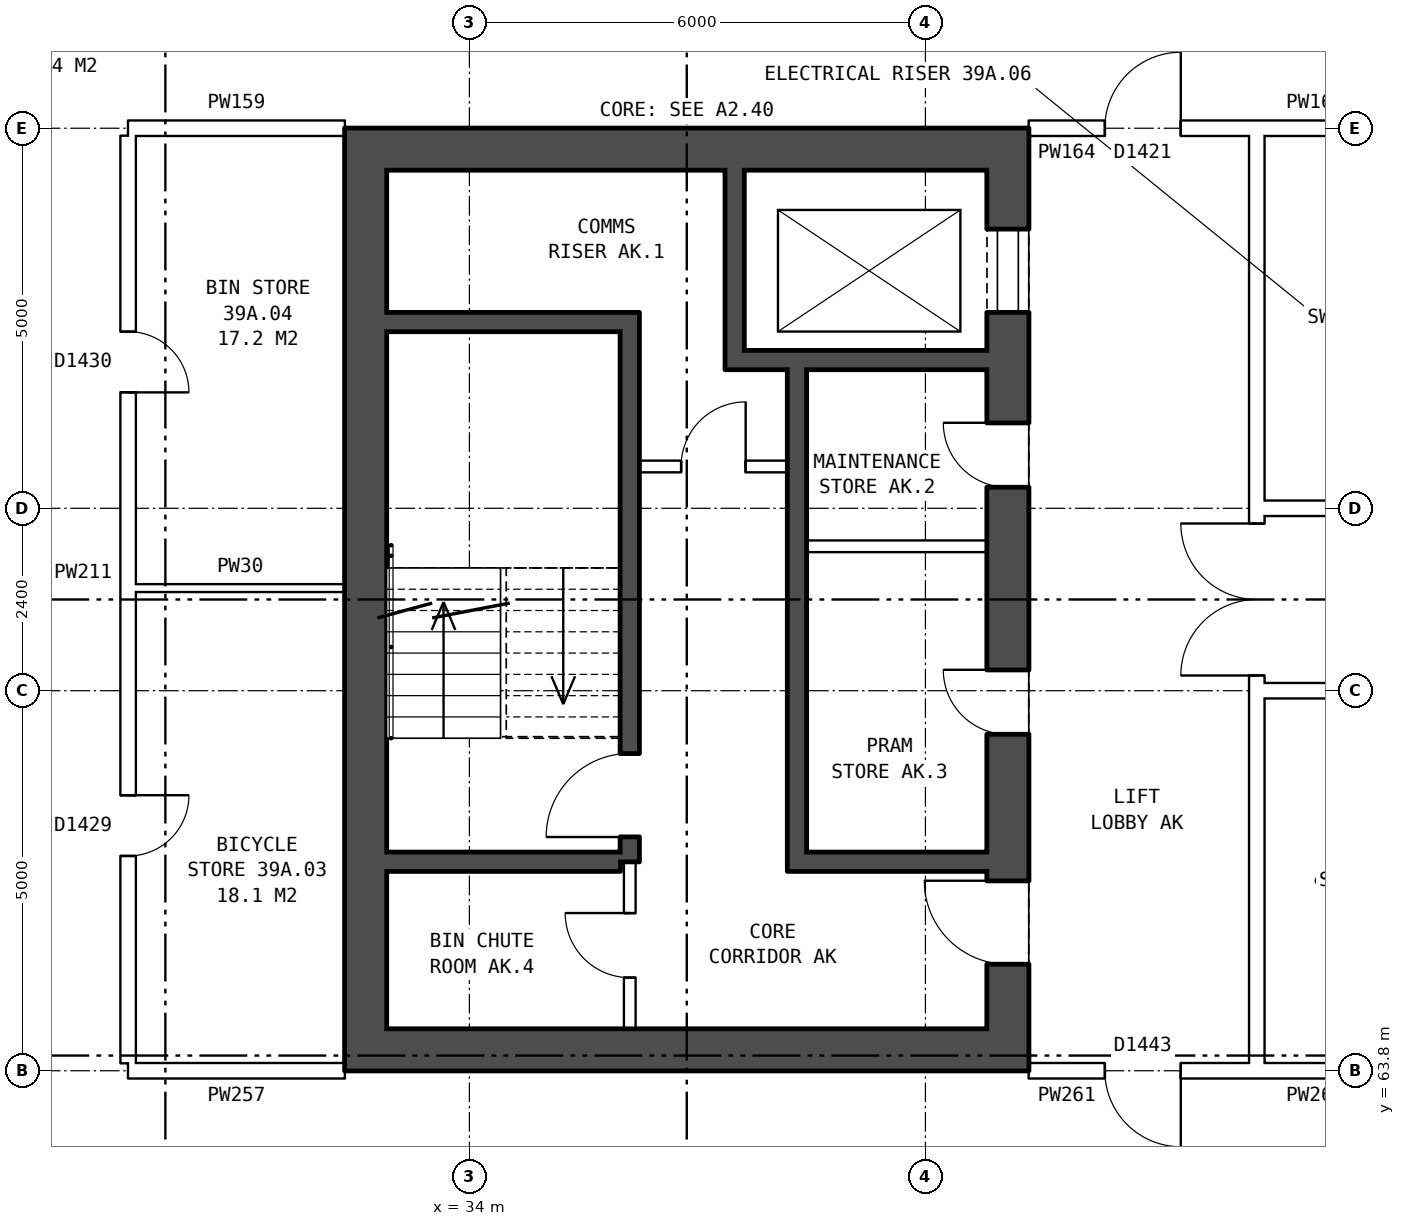
"""IFC4 building model, lengths in metres.
Left out: names, types, materials, properties, quantities, classifications, styles, units other than length and angle.
Written with IfcOpenShell. Run it as: python <this file> out.ifc"""

import sys

from ifc_helpers import new_model, si_unit, direction, frame, frame_2d, origin, place, context, subcontext, project, spatial, rectangle, extrude, element, fill, save


model = new_model("IFC4")
c1 = context("Model", 3, precision=1e-05, world=origin(), true_north=direction((0.0, 1.0)))
c2 = subcontext(c1, "Body", "Model", "MODEL_VIEW")
j1 = project(units=[si_unit("LENGTHUNIT", "METRE"), si_unit("PLANEANGLEUNIT", "RADIAN")], contexts=[c1])
p1 = place(None, origin())
s1 = spatial("IfcSite", under=j1, at=p1, CompositionType="ELEMENT")
p2 = place(p1, origin())
s2 = spatial("IfcBuilding", under=s1, at=p2, CompositionType="ELEMENT")
p3 = place(p2, frame((0.0, 0.0, 139.2)))
s3 = spatial("IfcBuildingStorey", under=s2, at=p3, CompositionType="ELEMENT", Elevation=139.2)
p4 = place(p3, frame((41.085, 76.2, 0.0), z_axis=(0.0, 0.0, 1.0), x_axis=(0.0, -1.0, 0.0)))
e1 = element("IfcWall", 1, at=p4, inside=s3, PredefinedType="SHEAR", context=c2, shape_type="SweptSolid", body=[
    extrude(rectangle(XDim=12.4, YDim=0.55, at=frame_2d((6.2, 0.0))), origin(), (0.0, 0.0, 1.0), 2.85),
])
p5 = place(p4, frame((1.325, 0.0, 0.0)))
e2 = element("IfcOpeningElement", 2, at=p5, cuts=e1, PredefinedType="OPENING", context=c2, shape_type="SweptSolid", body=[
    extrude(rectangle(XDim=1.1, YDim=2.1, at=frame_2d((0.55, 1.05))), frame((0.0, 0.285, 0.0), z_axis=(0.0, -1.0, 0.0), x_axis=(1.0, 0.0, 0.0)), (0.0, 0.0, 1.0), 0.57),
])
p6 = place(p4, frame((3.875, 0.0, 0.0)))
e3 = element("IfcOpeningElement", 3, at=p6, cuts=e1, PredefinedType="OPENING", context=c2, shape_type="SweptSolid", body=[
    extrude(rectangle(XDim=0.85, YDim=2.1, at=frame_2d((0.425, 1.05))), frame((0.0, 0.285, 0.0), z_axis=(0.0, -1.0, 0.0), x_axis=(1.0, 0.0, 0.0)), (0.0, 0.0, 1.0), 0.57),
])
p7 = place(p4, frame((7.125, 0.0, 0.0)))
e4 = element("IfcOpeningElement", 4, at=p7, cuts=e1, PredefinedType="OPENING", context=c2, shape_type="SweptSolid", body=[
    extrude(rectangle(XDim=0.85, YDim=2.1, at=frame_2d((0.425, 1.05))), frame((0.0, 0.285, 0.0), z_axis=(0.0, -1.0, 0.0), x_axis=(1.0, 0.0, 0.0)), (0.0, 0.0, 1.0), 0.57),
])
p8 = place(p4, frame((9.9, 0.0, 0.0)))
e5 = element("IfcOpeningElement", 5, at=p8, cuts=e1, PredefinedType="OPENING", context=c2, shape_type="SweptSolid", body=[
    extrude(rectangle(XDim=1.1, YDim=2.1, at=frame_2d((0.55, 1.05))), frame((0.0, 0.285, 0.0), z_axis=(0.0, -1.0, 0.0), x_axis=(1.0, 0.0, 0.0)), (0.0, 0.0, 1.0), 0.57),
])
p9 = place(p3, frame((32.635, 76.2, 0.0), z_axis=(0.0, 0.0, 1.0), x_axis=(0.0, -1.0, 0.0)))
e6 = element("IfcWall", 6, at=p9, inside=s3, PredefinedType="SHEAR", context=c2, shape_type="SweptSolid", body=[
    extrude(rectangle(XDim=12.4, YDim=0.55, at=frame_2d((6.2, 0.0))), origin(), (0.0, 0.0, 1.0), 2.85),
])
for number, where, z_axis, x_axis in (
    (7, (40.81, 75.925, 0.0), (0.0, 0.0, 1.0), (-1.0, 0.0, 0.0)),
    (8, (40.81, 64.075, 0.0), (0.0, 0.0, 1.0), (-1.0, 0.0, 0.0)),
):
    element("IfcWall", number, at=place(p3, frame(where, z_axis=z_axis, x_axis=x_axis)), inside=s3, PredefinedType="SHEAR", context=c2, shape_type="SweptSolid", body=[
        extrude(rectangle(XDim=7.9, YDim=0.55, at=frame_2d((3.95, 0.0))), origin(), (0.0, 0.0, 1.0), 2.85),
    ])
p10 = place(p3, frame((35.985, 73.65, 0.0), z_axis=(0.0, 0.0, 1.0), x_axis=(-1.0, 0.0, 0.0)))
e9 = element("IfcWall", 9, at=p10, inside=s3, PredefinedType="SHEAR", context=c2, shape_type="SweptSolid", body=[
    extrude(rectangle(XDim=3.075, YDim=0.25, at=frame_2d((1.538, 0.0))), origin(), (0.0, 0.0, 1.0), 2.85),
])
p11 = place(p3, frame((40.81, 73.15, 0.0), z_axis=(0.0, 0.0, 1.0), x_axis=(-1.0, 0.0, 0.0)))
e10 = element("IfcWall", 10, at=p11, inside=s3, PredefinedType="SHEAR", context=c2, shape_type="SweptSolid", body=[
    extrude(rectangle(XDim=3.445, YDim=0.25, at=frame_2d((1.723, 0.0))), origin(), (0.0, 0.0, 1.0), 2.85),
])
p12 = place(p3, frame((38.185, 71.75, 0.0), z_axis=(0.0, 0.0, 1.0), x_axis=(-1.0, 0.0, 0.0)))
e11 = element("IfcWall", 11, at=p12, inside=s3, PredefinedType="PARTITIONING", context=c2, shape_type="SweptSolid", body=[
    extrude(rectangle(XDim=1.95, YDim=0.15, at=frame_2d((0.975, 0.0))), origin(), (0.0, 0.0, 1.0), 2.85),
])
p13 = place(p12, frame((0.55, 0.0, 0.0)))
e12 = element("IfcOpeningElement", 12, at=p13, cuts=e11, PredefinedType="OPENING", context=c2, shape_type="SweptSolid", body=[
    extrude(rectangle(XDim=0.85, YDim=2.1, at=frame_2d((0.425, 1.05))), frame((0.0, 0.085, 0.0), z_axis=(0.0, -1.0, 0.0), x_axis=(1.0, 0.0, 0.0)), (0.0, 0.0, 1.0), 0.17),
])
p14 = place(p3, frame((40.81, 70.7, 0.0), z_axis=(0.0, 0.0, 1.0), x_axis=(-1.0, 0.0, 0.0)))
e13 = element("IfcWall", 13, at=p14, inside=s3, PredefinedType="PARTITIONING", context=c2, shape_type="SweptSolid", body=[
    extrude(rectangle(XDim=2.375, YDim=0.15, at=frame_2d((1.188, 0.0))), origin(), (0.0, 0.0, 1.0), 2.85),
])
p15 = place(p3, frame((40.81, 66.55, 0.0), z_axis=(0.0, 0.0, 1.0), x_axis=(-1.0, 0.0, 0.0)))
e14 = element("IfcWall", 14, at=p15, inside=s3, PredefinedType="SHEAR", context=c2, shape_type="SweptSolid", body=[
    extrude(rectangle(XDim=2.375, YDim=0.25, at=frame_2d((1.188, 0.0))), origin(), (0.0, 0.0, 1.0), 2.85),
])
p16 = place(p3, frame((35.985, 66.55, 0.0), z_axis=(0.0, 0.0, 1.0), x_axis=(-1.0, 0.0, 0.0)))
e15 = element("IfcWall", 15, at=p16, inside=s3, PredefinedType="SHEAR", context=c2, shape_type="SweptSolid", body=[
    extrude(rectangle(XDim=3.075, YDim=0.25, at=frame_2d((1.538, 0.0))), origin(), (0.0, 0.0, 1.0), 2.85),
])
p17 = place(p3, frame((38.31, 73.025, 0.0), z_axis=(0.0, 0.0, 1.0), x_axis=(0.0, -1.0, 0.0)))
e16 = element("IfcWall", 16, at=p17, inside=s3, PredefinedType="SHEAR", context=c2, shape_type="SweptSolid", body=[
    extrude(rectangle(XDim=6.6, YDim=0.25, at=frame_2d((3.3, 0.0))), origin(), (0.0, 0.0, 1.0), 2.85),
])
p18 = place(p3, frame((37.49, 75.65, 0.0), z_axis=(0.0, 0.0, 1.0), x_axis=(0.0, -1.0, 0.0)))
e17 = element("IfcWall", 17, at=p18, inside=s3, PredefinedType="SHEAR", context=c2, shape_type="SweptSolid", body=[
    extrude(rectangle(XDim=2.375, YDim=0.25, at=frame_2d((1.188, 0.0))), origin(), (0.0, 0.0, 1.0), 2.85),
])
p19 = place(p3, frame((36.11, 73.775, 0.0), z_axis=(0.0, 0.0, 1.0), x_axis=(0.0, -1.0, 0.0)))
e18 = element("IfcWall", 18, at=p19, inside=s3, PredefinedType="SHEAR", context=c2, shape_type="SweptSolid", body=[
    extrude(rectangle(XDim=7.225, YDim=0.25, at=frame_2d((3.612, 0.0))), origin(), (0.0, 0.0, 1.0), 2.85),
])
p20 = place(p19, frame((5.8, 0.0, 0.0)))
e19 = element("IfcOpeningElement", 19, at=p20, cuts=e18, PredefinedType="OPENING", context=c2, shape_type="SweptSolid", body=[
    extrude(rectangle(XDim=1.1, YDim=2.1, at=frame_2d((0.55, 1.05))), frame((0.0, 0.135, 0.0), z_axis=(0.0, -1.0, 0.0), x_axis=(1.0, 0.0, 0.0)), (0.0, 0.0, 1.0), 0.27),
])
p21 = place(p3, frame((36.11, 66.55, 0.0), z_axis=(0.0, 0.0, 1.0), x_axis=(0.0, -1.0, 0.0)))
e20 = element("IfcWall", 20, at=p21, inside=s3, PredefinedType="PARTITIONING", context=c2, shape_type="SweptSolid", body=[
    extrude(rectangle(XDim=2.2, YDim=0.15, at=frame_2d((1.1, 0.0))), origin(), (0.0, 0.0, 1.0), 2.85),
])
p22 = place(p21, frame((0.675, 0.0, 0.0)))
e21 = element("IfcOpeningElement", 21, at=p22, cuts=e20, PredefinedType="OPENING", context=c2, shape_type="SweptSolid", body=[
    extrude(rectangle(XDim=0.85, YDim=2.1, at=frame_2d((0.425, 1.05))), frame((0.0, 0.085, 0.0), z_axis=(0.0, -1.0, 0.0), x_axis=(1.0, 0.0, 0.0)), (0.0, 0.0, 1.0), 0.17),
])
p23 = place(p3, frame((44.36, 63.9, 0.0), z_axis=(0.0, 0.0, 1.0), x_axis=(0.0, 1.0, 0.0)))
e22 = element("IfcWall", 22, at=p23, inside=s3, PredefinedType="PARTITIONING", context=c2, shape_type="SweptSolid", body=[
    extrude(rectangle(XDim=12.2, YDim=0.2, at=frame_2d((6.1, 0.0))), origin(), (0.0, 0.0, 1.0), 2.85),
])
p24 = place(p23, frame((5.1, 0.0, 0.0)))
e23 = element("IfcOpeningElement", 23, at=p24, cuts=e22, PredefinedType="OPENING", context=c2, shape_type="SweptSolid", body=[
    extrude(rectangle(XDim=2.0, YDim=2.1, at=frame_2d((1.0, 1.05))), frame((0.0, 0.11, 0.0), z_axis=(0.0, -1.0, 0.0), x_axis=(1.0, 0.0, 0.0)), (0.0, 0.0, 1.0), 0.22),
])
p25 = place(p3, frame((29.51, 63.8, 0.0), z_axis=(0.0, 0.0, 1.0), x_axis=(1.0, 0.0, 0.0)))
e24 = element("IfcWall", 24, at=p25, inside=s3, PredefinedType="PARTITIONING", context=c2, shape_type="SweptSolid", body=[
    extrude(rectangle(XDim=2.85, YDim=0.2, at=frame_2d((1.425, 0.0))), origin(), (0.0, 0.0, 1.0), 2.85),
])
p26 = place(p3, frame((41.36, 63.8, 0.0), z_axis=(0.0, 0.0, 1.0), x_axis=(1.0, 0.0, 0.0)))
e25 = element("IfcWall", 25, at=p26, inside=s3, PredefinedType="PARTITIONING", context=c2, shape_type="SweptSolid", body=[
    extrude(rectangle(XDim=3.0, YDim=0.2, at=frame_2d((1.5, 0.0))), origin(), (0.0, 0.0, 1.0), 2.85),
])
p27 = place(p26, frame((1.0, 0.0, 0.0)))
e26 = element("IfcOpeningElement", 26, at=p27, cuts=e25, PredefinedType="OPENING", context=c2, shape_type="SweptSolid", body=[
    extrude(rectangle(XDim=1.0, YDim=2.1, at=frame_2d((0.5, 1.05))), frame((0.0, 0.11, 0.0), z_axis=(0.0, -1.0, 0.0), x_axis=(1.0, 0.0, 0.0)), (0.0, 0.0, 1.0), 0.22),
])
p28 = place(p3, frame((44.36, 63.8, 0.0), z_axis=(0.0, 0.0, 1.0), x_axis=(1.0, 0.0, 0.0)))
e27 = element("IfcWall", 27, at=p28, inside=s3, PredefinedType="PARTITIONING", context=c2, shape_type="SweptSolid", body=[
    extrude(rectangle(XDim=1.54, YDim=0.2, at=frame_2d((0.77, 0.0))), origin(), (0.0, 0.0, 1.0), 2.85),
])
p29 = place(p3, frame((44.36, 68.8, 0.0), z_axis=(0.0, 0.0, 1.0), x_axis=(1.0, 0.0, 0.0)))
e28 = element("IfcWall", 28, at=p29, inside=s3, PredefinedType="PARTITIONING", context=c2, shape_type="SweptSolid", body=[
    extrude(rectangle(XDim=19.28, YDim=0.2, at=frame_2d((9.64, 0.0))), origin(), (0.0, 0.0, 1.0), 2.85),
])
p30 = place(p29, frame((14.64, 0.0, 0.0)))
e29 = element("IfcOpeningElement", 29, at=p30, cuts=e28, PredefinedType="OPENING", context=c2, shape_type="SweptSolid", body=[
    extrude(rectangle(XDim=1.0, YDim=2.1, at=frame_2d((0.5, 1.05))), frame((0.0, 0.11, 0.0), z_axis=(0.0, -1.0, 0.0), x_axis=(1.0, 0.0, 0.0)), (0.0, 0.0, 1.0), 0.22),
])
p31 = place(p29, frame((8.64, 0.0, 0.0)))
e30 = element("IfcOpeningElement", 30, at=p31, cuts=e28, PredefinedType="OPENING", context=c2, shape_type="SweptSolid", body=[
    extrude(rectangle(XDim=1.0, YDim=2.1, at=frame_2d((0.5, 1.05))), frame((0.0, 0.11, 0.0), z_axis=(0.0, -1.0, 0.0), x_axis=(1.0, 0.0, 0.0)), (0.0, 0.0, 1.0), 0.22),
])
p32 = place(p29, frame((2.64, 0.0, 0.0)))
e31 = element("IfcOpeningElement", 31, at=p32, cuts=e28, PredefinedType="OPENING", context=c2, shape_type="SweptSolid", body=[
    extrude(rectangle(XDim=1.0, YDim=2.1, at=frame_2d((0.5, 1.05))), frame((0.0, 0.11, 0.0), z_axis=(0.0, -1.0, 0.0), x_axis=(1.0, 0.0, 0.0)), (0.0, 0.0, 1.0), 0.22),
])
p33 = place(p3, frame((29.61, 70.15, 0.0), z_axis=(0.0, 0.0, 1.0), x_axis=(1.0, 0.0, 0.0)))
e32 = element("IfcWall", 32, at=p33, inside=s3, PredefinedType="PARTITIONING", context=c2, shape_type="SweptSolid", body=[
    extrude(rectangle(XDim=2.75, YDim=0.1, at=frame_2d((1.375, 0.0))), origin(), (0.0, 0.0, 1.0), 2.85),
])
p34 = place(p3, frame((44.36, 71.2, 0.0), z_axis=(0.0, 0.0, 1.0), x_axis=(1.0, 0.0, 0.0)))
e33 = element("IfcWall", 33, at=p34, inside=s3, PredefinedType="PARTITIONING", context=c2, shape_type="SweptSolid", body=[
    extrude(rectangle(XDim=19.28, YDim=0.2, at=frame_2d((9.64, 0.0))), origin(), (0.0, 0.0, 1.0), 2.85),
])
p35 = place(p34, frame((17.46, 0.0, 0.0)))
e34 = element("IfcOpeningElement", 34, at=p35, cuts=e33, PredefinedType="OPENING", context=c2, shape_type="SweptSolid", body=[
    extrude(rectangle(XDim=1.0, YDim=2.1, at=frame_2d((0.5, 1.05))), frame((0.0, 0.11, 0.0), z_axis=(0.0, -1.0, 0.0), x_axis=(1.0, 0.0, 0.0)), (0.0, 0.0, 1.0), 0.22),
])
p36 = place(p34, frame((8.64, 0.0, 0.0)))
e35 = element("IfcOpeningElement", 35, at=p36, cuts=e33, PredefinedType="OPENING", context=c2, shape_type="SweptSolid", body=[
    extrude(rectangle(XDim=1.0, YDim=2.1, at=frame_2d((0.5, 1.05))), frame((0.0, 0.11, 0.0), z_axis=(0.0, -1.0, 0.0), x_axis=(1.0, 0.0, 0.0)), (0.0, 0.0, 1.0), 0.22),
])
p37 = place(p34, frame((2.64, 0.0, 0.0)))
e36 = element("IfcOpeningElement", 36, at=p37, cuts=e33, PredefinedType="OPENING", context=c2, shape_type="SweptSolid", body=[
    extrude(rectangle(XDim=1.0, YDim=2.1, at=frame_2d((0.5, 1.05))), frame((0.0, 0.11, 0.0), z_axis=(0.0, -1.0, 0.0), x_axis=(1.0, 0.0, 0.0)), (0.0, 0.0, 1.0), 0.22),
])
p38 = place(p3, frame((29.51, 76.2, 0.0), z_axis=(0.0, 0.0, 1.0), x_axis=(1.0, 0.0, 0.0)))
e37 = element("IfcWall", 37, at=p38, inside=s3, PredefinedType="PARTITIONING", context=c2, shape_type="SweptSolid", body=[
    extrude(rectangle(XDim=2.85, YDim=0.2, at=frame_2d((1.425, 0.0))), origin(), (0.0, 0.0, 1.0), 2.85),
])
p39 = place(p3, frame((41.36, 76.2, 0.0), z_axis=(0.0, 0.0, 1.0), x_axis=(1.0, 0.0, 0.0)))
e38 = element("IfcWall", 38, at=p39, inside=s3, PredefinedType="PARTITIONING", context=c2, shape_type="SweptSolid", body=[
    extrude(rectangle(XDim=3.0, YDim=0.2, at=frame_2d((1.5, 0.0))), origin(), (0.0, 0.0, 1.0), 2.85),
])
p40 = place(p39, frame((1.0, 0.0, 0.0)))
e39 = element("IfcOpeningElement", 39, at=p40, cuts=e38, PredefinedType="OPENING", context=c2, shape_type="SweptSolid", body=[
    extrude(rectangle(XDim=1.0, YDim=2.1, at=frame_2d((0.5, 1.05))), frame((0.0, 0.11, 0.0), z_axis=(0.0, -1.0, 0.0), x_axis=(1.0, 0.0, 0.0)), (0.0, 0.0, 1.0), 0.22),
])
p41 = place(p3, frame((44.36, 76.2, 0.0), z_axis=(0.0, 0.0, 1.0), x_axis=(1.0, 0.0, 0.0)))
e40 = element("IfcWall", 40, at=p41, inside=s3, PredefinedType="PARTITIONING", context=c2, shape_type="SweptSolid", body=[
    extrude(rectangle(XDim=1.54, YDim=0.2, at=frame_2d((0.77, 0.0))), origin(), (0.0, 0.0, 1.0), 2.85),
])
p42 = place(p3, frame((29.51, 63.9, 0.0), z_axis=(0.0, 0.0, 1.0), x_axis=(0.0, 1.0, 0.0)))
e41 = element("IfcWall", 41, at=p42, inside=s3, PredefinedType="PARTITIONING", context=c2, shape_type="SweptSolid", body=[
    extrude(rectangle(XDim=12.2, YDim=0.2, at=frame_2d((6.1, 0.0))), origin(), (0.0, 0.0, 1.0), 2.85),
])
p43 = place(p42, frame((2.725, 0.0, 0.0)))
e42 = element("IfcOpeningElement", 42, at=p43, cuts=e41, PredefinedType="OPENING", context=c2, shape_type="SweptSolid", body=[
    extrude(rectangle(XDim=0.8, YDim=2.1, at=frame_2d((0.4, 1.05))), frame((0.0, 0.11, 0.0), z_axis=(0.0, -1.0, 0.0), x_axis=(1.0, 0.0, 0.0)), (0.0, 0.0, 1.0), 0.22),
])
p44 = place(p42, frame((8.825, 0.0, 0.0)))
e43 = element("IfcOpeningElement", 43, at=p44, cuts=e41, PredefinedType="OPENING", context=c2, shape_type="SweptSolid", body=[
    extrude(rectangle(XDim=0.8, YDim=2.1, at=frame_2d((0.4, 1.05))), frame((0.0, 0.11, 0.0), z_axis=(0.0, -1.0, 0.0), x_axis=(1.0, 0.0, 0.0)), (0.0, 0.0, 1.0), 0.22),
])
p45 = place(p5, origin())
e44 = element("IfcDoor", 44, at=p45, inside=s3, OperationType="DOUBLE_DOOR_SLIDING", PredefinedType="DOOR", context=c2, shape_type="SweptSolid", body=[
    extrude(rectangle(XDim=1.1, YDim=2.1, at=frame_2d((0.55, 1.05))), frame((0.0, -0.21, 0.0), z_axis=(0.0, -1.0, 0.0), x_axis=(1.0, 0.0, 0.0)), (0.0, 0.0, 1.0), 0.05),
])
fill(e2, e44)
p46 = place(p6, frame((0.85, 0.0, 0.0), z_axis=(0.0, 0.0, 1.0), x_axis=(-1.0, 0.0, 0.0)))
e45 = element("IfcDoor", 45, at=p46, inside=s3, OperationType="SINGLE_SWING_RIGHT", PredefinedType="DOOR", context=c2, shape_type="SweptSolid", body=[
    extrude(rectangle(XDim=0.85, YDim=2.1, at=frame_2d((0.425, 1.05))), frame((0.0, 0.26, 0.0), z_axis=(0.0, -1.0, 0.0), x_axis=(1.0, 0.0, 0.0)), (0.0, 0.0, 1.0), 0.05),
])
fill(e3, e45)
p47 = place(p7, frame((0.85, 0.0, 0.0), z_axis=(0.0, 0.0, 1.0), x_axis=(-1.0, 0.0, 0.0)))
e46 = element("IfcDoor", 46, at=p47, inside=s3, OperationType="SINGLE_SWING_RIGHT", PredefinedType="DOOR", context=c2, shape_type="SweptSolid", body=[
    extrude(rectangle(XDim=0.85, YDim=2.1, at=frame_2d((0.425, 1.05))), frame((0.0, 0.26, 0.0), z_axis=(0.0, -1.0, 0.0), x_axis=(1.0, 0.0, 0.0)), (0.0, 0.0, 1.0), 0.05),
])
fill(e4, e46)
p48 = place(p8, frame((1.1, 0.0, 0.0), z_axis=(0.0, 0.0, 1.0), x_axis=(-1.0, 0.0, 0.0)))
e47 = element("IfcDoor", 47, at=p48, inside=s3, OperationType="SINGLE_SWING_RIGHT", PredefinedType="DOOR", context=c2, shape_type="SweptSolid", body=[
    extrude(rectangle(XDim=1.1, YDim=2.1, at=frame_2d((0.55, 1.05))), frame((0.0, 0.26, 0.0), z_axis=(0.0, -1.0, 0.0), x_axis=(1.0, 0.0, 0.0)), (0.0, 0.0, 1.0), 0.05),
])
fill(e5, e47)
p49 = place(p20, frame((1.1, 0.0, 0.0), z_axis=(0.0, 0.0, 1.0), x_axis=(-1.0, 0.0, 0.0)))
e48 = element("IfcDoor", 48, at=p49, inside=s3, OperationType="SINGLE_SWING_LEFT", PredefinedType="DOOR", context=c2, shape_type="SweptSolid", body=[
    extrude(rectangle(XDim=1.1, YDim=2.1, at=frame_2d((0.55, 1.05))), frame((0.0, 0.025, 0.0), z_axis=(0.0, -1.0, 0.0), x_axis=(1.0, 0.0, 0.0)), (0.0, 0.0, 1.0), 0.05),
])
fill(e19, e48)
p50 = place(p13, frame((0.85, 0.0, 0.0), z_axis=(0.0, 0.0, 1.0), x_axis=(-1.0, 0.0, 0.0)))
e49 = element("IfcDoor", 49, at=p50, inside=s3, OperationType="SINGLE_SWING_RIGHT", PredefinedType="DOOR", context=c2, shape_type="SweptSolid", body=[
    extrude(rectangle(XDim=0.85, YDim=2.1, at=frame_2d((0.425, 1.05))), frame((0.0, 0.025, 0.0), z_axis=(0.0, -1.0, 0.0), x_axis=(1.0, 0.0, 0.0)), (0.0, 0.0, 1.0), 0.05),
])
fill(e12, e49)
p51 = place(p22, frame((0.85, 0.0, 0.0), z_axis=(0.0, 0.0, 1.0), x_axis=(-1.0, 0.0, 0.0)))
e50 = element("IfcDoor", 50, at=p51, inside=s3, OperationType="SINGLE_SWING_RIGHT", PredefinedType="DOOR", context=c2, shape_type="SweptSolid", body=[
    extrude(rectangle(XDim=0.85, YDim=2.1, at=frame_2d((0.425, 1.05))), frame((0.0, 0.025, 0.0), z_axis=(0.0, -1.0, 0.0), x_axis=(1.0, 0.0, 0.0)), (0.0, 0.0, 1.0), 0.05),
])
fill(e21, e50)
p52 = place(p24, origin())
e51 = element("IfcDoor", 51, at=p52, inside=s3, OperationType="DOUBLE_DOOR_SINGLE_SWING", PredefinedType="DOOR", context=c2, shape_type="SweptSolid", body=[
    extrude(rectangle(XDim=2.0, YDim=2.1, at=frame_2d((1.0, 1.05))), frame((0.0, 0.025, 0.0), z_axis=(0.0, -1.0, 0.0), x_axis=(1.0, 0.0, 0.0)), (0.0, 0.0, 1.0), 0.05),
])
fill(e23, e51)
p53 = place(p27, frame((1.0, 0.0, 0.0), z_axis=(0.0, 0.0, 1.0), x_axis=(-1.0, 0.0, 0.0)))
e52 = element("IfcDoor", 52, at=p53, inside=s3, OperationType="SINGLE_SWING_LEFT", PredefinedType="DOOR", context=c2, shape_type="SweptSolid", body=[
    extrude(rectangle(XDim=1.0, YDim=2.1, at=frame_2d((0.5, 1.05))), frame((0.0, 0.025, 0.0), z_axis=(0.0, -1.0, 0.0), x_axis=(1.0, 0.0, 0.0)), (0.0, 0.0, 1.0), 0.05),
])
fill(e26, e52)
p54 = place(p40, origin())
e53 = element("IfcDoor", 53, at=p54, inside=s3, OperationType="SINGLE_SWING_RIGHT", PredefinedType="DOOR", context=c2, shape_type="SweptSolid", body=[
    extrude(rectangle(XDim=1.0, YDim=2.1, at=frame_2d((0.5, 1.05))), frame((0.0, 0.025, 0.0), z_axis=(0.0, -1.0, 0.0), x_axis=(1.0, 0.0, 0.0)), (0.0, 0.0, 1.0), 0.05),
])
fill(e39, e53)
p55 = place(p43, frame((0.8, 0.0, 0.0), z_axis=(0.0, 0.0, 1.0), x_axis=(-1.0, 0.0, 0.0)))
e54 = element("IfcDoor", 54, at=p55, inside=s3, OperationType="SINGLE_SWING_LEFT", PredefinedType="DOOR", context=c2, shape_type="SweptSolid", body=[
    extrude(rectangle(XDim=0.8, YDim=2.1, at=frame_2d((0.4, 1.05))), frame((0.0, 0.025, 0.0), z_axis=(0.0, -1.0, 0.0), x_axis=(1.0, 0.0, 0.0)), (0.0, 0.0, 1.0), 0.05),
])
fill(e42, e54)
p56 = place(p44, frame((0.8, 0.0, 0.0), z_axis=(0.0, 0.0, 1.0), x_axis=(-1.0, 0.0, 0.0)))
e55 = element("IfcDoor", 55, at=p56, inside=s3, OperationType="SINGLE_SWING_RIGHT", PredefinedType="DOOR", context=c2, shape_type="SweptSolid", body=[
    extrude(rectangle(XDim=0.8, YDim=2.1, at=frame_2d((0.4, 1.05))), frame((0.0, 0.025, 0.0), z_axis=(0.0, -1.0, 0.0), x_axis=(1.0, 0.0, 0.0)), (0.0, 0.0, 1.0), 0.05),
])
fill(e43, e55)
save(model, sys.argv[1])
